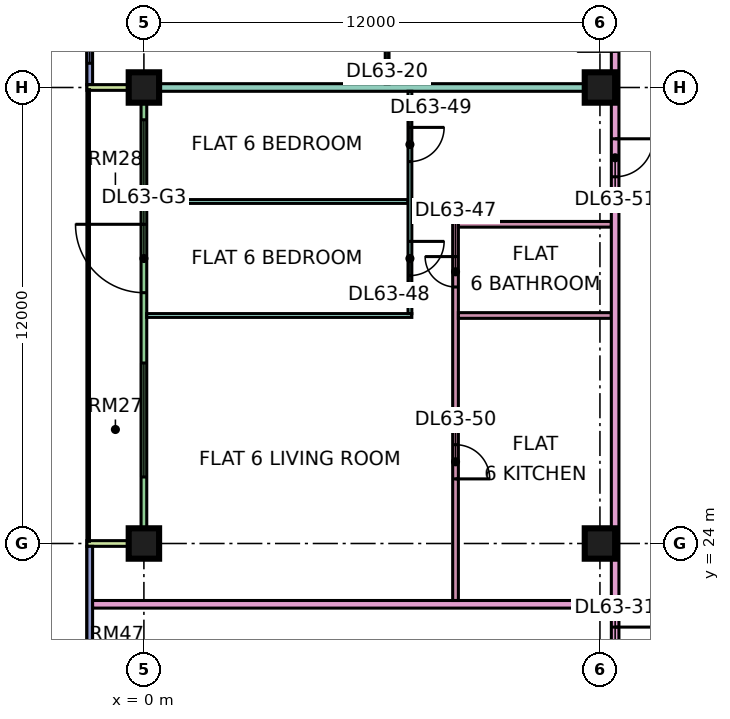
"""IFC4 building model, lengths in metres.
Left out: names, types, materials, properties, quantities, classifications, styles, units other than length and angle.
Written with IfcOpenShell. Run it as: python <this file> out.ifc"""

import sys

from ifc_helpers import new_model, si_unit, direction, frame, frame_2d, origin, origin_2d, place, context, subcontext, project, spatial, rectangle, extrude, element, fill, save


model = new_model("IFC4")
c1 = context("Model", 3, precision=1e-05, world=origin(), true_north=direction((0.0, 1.0)))
c2 = subcontext(c1, "Body", "Model", "MODEL_VIEW")
j1 = project(units=[si_unit("LENGTHUNIT", "METRE"), si_unit("PLANEANGLEUNIT", "RADIAN")], contexts=[c1])
p1 = place(None, origin())
s1 = spatial("IfcSite", under=j1, at=p1, CompositionType="ELEMENT")
p2 = place(p1, origin())
s2 = spatial("IfcBuilding", under=s1, at=p2, CompositionType="ELEMENT")
p3 = place(p2, frame((0.0, 0.0, 273.4)))
s3 = spatial("IfcBuildingStorey", under=s2, at=p3, CompositionType="ELEMENT", Elevation=273.4)
p4 = place(p3, frame((0.0, 24.0, 0.0), z_axis=(0.0, 0.0, 1.0), x_axis=(1.0, 0.0, 0.0)))
e1 = element("IfcColumn", 1, at=p4, inside=s3, PredefinedType="COLUMN", context=c2, shape_type="SweptSolid", body=[
    extrude(rectangle(XDim=0.8, YDim=0.8, at=origin_2d()), origin(), (0.0, 0.0, 1.0), 3.75),
])
p5 = place(p3, frame((0.0, 36.0, 0.0), z_axis=(0.0, 0.0, 1.0), x_axis=(1.0, 0.0, 0.0)))
e2 = element("IfcColumn", 2, at=p5, inside=s3, PredefinedType="COLUMN", context=c2, shape_type="SweptSolid", body=[
    extrude(rectangle(XDim=0.8, YDim=0.8, at=origin_2d()), origin(), (0.0, 0.0, 1.0), 3.75),
])
for number, where, z_axis, x_axis in (
    (3, (12.0, 24.0, 0.0), (0.0, 0.0, 1.0), (1.0, 0.0, 0.0)),
    (4, (12.0, 36.0, 0.0), (0.0, 0.0, 1.0), (1.0, 0.0, 0.0)),
):
    element("IfcColumn", number, at=place(p3, frame(where, z_axis=z_axis, x_axis=x_axis)), inside=s3, PredefinedType="COLUMN", context=c2, shape_type="SweptSolid", body=[
        extrude(rectangle(XDim=0.8, YDim=0.8, at=origin_2d()), origin(), (0.0, 0.0, 1.0), 3.75),
    ])
p6 = place(p3, frame((-1.425, 47.925, 0.0), z_axis=(0.0, 0.0, 1.0), x_axis=(0.0, -1.0, 0.0)))
e5 = element("IfcWall", 5, at=p6, inside=s3, PredefinedType="SOLIDWALL", context=c2, shape_type="SweptSolid", body=[
    extrude(rectangle(XDim=11.85, YDim=0.15, at=frame_2d((5.925, 0.0))), origin(), (0.0, 0.0, 1.0), 3.35),
])
p7 = place(p6, frame((1.462, 0.0, 0.45)))
e6 = element("IfcOpeningElement", 6, at=p7, cuts=e5, PredefinedType="OPENING", context=c2, shape_type="SweptSolid", body=[
    extrude(rectangle(XDim=3.0, YDim=2.4, at=frame_2d((1.5, 1.2))), frame((0.0, 0.085, 0.0), z_axis=(0.0, -1.0, 0.0), x_axis=(1.0, 0.0, 0.0)), (0.0, 0.0, 1.0), 0.17),
])
p8 = place(p6, frame((6.525, 0.0, 0.45)))
e7 = element("IfcOpeningElement", 7, at=p8, cuts=e5, PredefinedType="OPENING", context=c2, shape_type="SweptSolid", body=[
    extrude(rectangle(XDim=1.8, YDim=2.4, at=frame_2d((0.9, 1.2))), frame((0.0, 0.085, 0.0), z_axis=(0.0, -1.0, 0.0), x_axis=(1.0, 0.0, 0.0)), (0.0, 0.0, 1.0), 0.17),
])
p9 = place(p6, frame((9.488, 0.0, 0.45)))
e8 = element("IfcOpeningElement", 8, at=p9, cuts=e5, PredefinedType="OPENING", context=c2, shape_type="SweptSolid", body=[
    extrude(rectangle(XDim=1.8, YDim=2.4, at=frame_2d((0.9, 1.2))), frame((0.0, 0.085, 0.0), z_axis=(0.0, -1.0, 0.0), x_axis=(1.0, 0.0, 0.0)), (0.0, 0.0, 1.0), 0.17),
])
p10 = place(p3, frame((0.0, 35.925, 0.0), z_axis=(0.0, 0.0, 1.0), x_axis=(0.0, -1.0, 0.0)))
e9 = element("IfcWall", 9, at=p10, inside=s3, PredefinedType="SOLIDWALL", context=c2, shape_type="SweptSolid", body=[
    extrude(rectangle(XDim=11.85, YDim=0.15, at=frame_2d((5.925, 0.0))), origin(), (0.0, 0.0, 1.0), 3.35),
])
p11 = place(p10, frame((0.775, 0.0, 0.45)))
e10 = element("IfcOpeningElement", 10, at=p11, cuts=e9, PredefinedType="OPENING", context=c2, shape_type="SweptSolid", body=[
    extrude(rectangle(XDim=1.8, YDim=2.4, at=frame_2d((0.9, 1.2))), frame((0.0, 0.085, 0.0), z_axis=(0.0, -1.0, 0.0), x_axis=(1.0, 0.0, 0.0)), (0.0, 0.0, 1.0), 0.17),
])
p12 = place(p10, frame((3.525, 0.0, 0.0)))
e11 = element("IfcOpeningElement", 11, at=p12, cuts=e9, PredefinedType="OPENING", context=c2, shape_type="SweptSolid", body=[
    extrude(rectangle(XDim=1.8, YDim=2.4, at=frame_2d((0.9, 1.2))), frame((0.0, 0.085, 0.0), z_axis=(0.0, -1.0, 0.0), x_axis=(1.0, 0.0, 0.0)), (0.0, 0.0, 1.0), 0.17),
])
p13 = place(p10, frame((7.175, 0.0, 0.45)))
e12 = element("IfcOpeningElement", 12, at=p13, cuts=e9, PredefinedType="OPENING", context=c2, shape_type="SweptSolid", body=[
    extrude(rectangle(XDim=3.0, YDim=2.4, at=frame_2d((1.5, 1.2))), frame((0.0, 0.085, 0.0), z_axis=(0.0, -1.0, 0.0), x_axis=(1.0, 0.0, 0.0)), (0.0, 0.0, 1.0), 0.17),
])
for number, where, z_axis, x_axis in (
    (13, (-1.5, 36.0, 0.0), (0.0, 0.0, 1.0), (1.0, 0.0, 0.0)),
    (14, (-1.5, 24.0, 0.0), (0.0, 0.0, 1.0), (1.0, 0.0, 0.0)),
):
    element("IfcWall", number, at=place(p3, frame(where, z_axis=z_axis, x_axis=x_axis)), inside=s3, PredefinedType="SOLIDWALL", context=c2, shape_type="SweptSolid", body=[
        extrude(rectangle(XDim=1.5, YDim=0.15, at=frame_2d((0.75, 0.0))), origin(), (0.0, 0.0, 1.0), 3.35),
    ])
p14 = place(p3, frame((-1.425, 23.925, 0.0), z_axis=(0.0, 0.0, 1.0), x_axis=(0.0, -1.0, 0.0)))
e15 = element("IfcWall", 15, at=p14, inside=s3, PredefinedType="SOLIDWALL", context=c2, shape_type="SweptSolid", body=[
    extrude(rectangle(XDim=11.425, YDim=0.15, at=frame_2d((5.712, 0.0))), origin(), (0.0, 0.0, 1.0), 3.35),
])
p15 = place(p14, frame((6.175, 0.0, 0.45)))
e16 = element("IfcOpeningElement", 16, at=p15, cuts=e15, PredefinedType="OPENING", context=c2, shape_type="SweptSolid", body=[
    extrude(rectangle(XDim=3.0, YDim=2.4, at=frame_2d((1.5, 1.2))), frame((0.0, 0.085, 0.0), z_axis=(0.0, -1.0, 0.0), x_axis=(1.0, 0.0, 0.0)), (0.0, 0.0, 1.0), 0.17),
])
p16 = place(p3, frame((-1.35, 22.4, 0.0), z_axis=(0.0, 0.0, 1.0), x_axis=(1.0, 0.0, 0.0)))
e17 = element("IfcWall", 17, at=p16, inside=s3, PredefinedType="PARTITIONING", context=c2, shape_type="SweptSolid", body=[
    extrude(rectangle(XDim=13.65, YDim=0.2, at=frame_2d((6.825, 0.0))), origin(), (0.0, 0.0, 1.0), 3.35),
])
e18 = element("IfcWall", 18, at=p5, inside=s3, PredefinedType="PARTITIONING", context=c2, shape_type="SweptSolid", body=[
    extrude(rectangle(XDim=12.3, YDim=0.2, at=frame_2d((6.15, 0.0))), origin(), (0.0, 0.0, 1.0), 3.35),
])
p17 = place(p3, frame((0.074, 30.0, 0.0), z_axis=(0.0, 0.0, 1.0), x_axis=(1.0, 0.0, 0.0)))
e19 = element("IfcWall", 19, at=p17, inside=s3, PredefinedType="PARTITIONING", context=c2, shape_type="SweptSolid", body=[
    extrude(rectangle(XDim=6.976, YDim=0.1, at=frame_2d((3.488, 0.0))), origin(), (0.0, 0.0, 1.0), 3.35),
])
p18 = place(p3, frame((0.074, 33.0, 0.0), z_axis=(0.0, 0.0, 1.0), x_axis=(1.0, 0.0, 0.0)))
e20 = element("IfcWall", 20, at=p18, inside=s3, PredefinedType="PARTITIONING", context=c2, shape_type="SweptSolid", body=[
    extrude(rectangle(XDim=6.876, YDim=0.1, at=frame_2d((3.438, 0.0))), origin(), (0.0, 0.0, 1.0), 3.35),
])
p19 = place(p3, frame((6.4, 36.1, 0.0), z_axis=(0.0, 0.0, 1.0), x_axis=(0.0, 1.0, 0.0)))
e21 = element("IfcWall", 21, at=p19, inside=s3, PredefinedType="PARTITIONING", context=c2, shape_type="SweptSolid", body=[
    extrude(rectangle(XDim=5.85, YDim=0.1, at=frame_2d((2.925, 0.0))), origin(), (0.0, 0.0, 1.0), 3.35),
])
p20 = place(p19, frame((0.95, 0.0, 0.0)))
e22 = element("IfcOpeningElement", 22, at=p20, cuts=e21, PredefinedType="OPENING", context=c2, shape_type="SweptSolid", body=[
    extrude(rectangle(XDim=0.9, YDim=2.1, at=frame_2d((0.45, 1.05))), frame((0.0, 0.06, 0.0), z_axis=(0.0, -1.0, 0.0), x_axis=(1.0, 0.0, 0.0)), (0.0, 0.0, 1.0), 0.12),
])
p21 = place(p19, frame((3.95, 0.0, 0.0)))
e23 = element("IfcOpeningElement", 23, at=p21, cuts=e21, PredefinedType="OPENING", context=c2, shape_type="SweptSolid", body=[
    extrude(rectangle(XDim=0.9, YDim=2.1, at=frame_2d((0.45, 1.05))), frame((0.0, 0.06, 0.0), z_axis=(0.0, -1.0, 0.0), x_axis=(1.0, 0.0, 0.0)), (0.0, 0.0, 1.0), 0.12),
])
p22 = place(p3, frame((7.0, 30.05, 0.0), z_axis=(0.0, 0.0, 1.0), x_axis=(0.0, 1.0, 0.0)))
e24 = element("IfcWall", 24, at=p22, inside=s3, PredefinedType="PARTITIONING", context=c2, shape_type="SweptSolid", body=[
    extrude(rectangle(XDim=5.85, YDim=0.1, at=frame_2d((2.925, 0.0))), origin(), (0.0, 0.0, 1.0), 3.35),
])
p23 = place(p22, frame((1.0, 0.0, 0.0)))
e25 = element("IfcOpeningElement", 25, at=p23, cuts=e24, PredefinedType="OPENING", context=c2, shape_type="SweptSolid", body=[
    extrude(rectangle(XDim=0.9, YDim=2.1, at=frame_2d((0.45, 1.05))), frame((0.0, 0.06, 0.0), z_axis=(0.0, -1.0, 0.0), x_axis=(1.0, 0.0, 0.0)), (0.0, 0.0, 1.0), 0.12),
])
p24 = place(p22, frame((4.0, 0.0, 0.0)))
e26 = element("IfcOpeningElement", 26, at=p24, cuts=e24, PredefinedType="OPENING", context=c2, shape_type="SweptSolid", body=[
    extrude(rectangle(XDim=0.9, YDim=2.1, at=frame_2d((0.45, 1.05))), frame((0.0, 0.06, 0.0), z_axis=(0.0, -1.0, 0.0), x_axis=(1.0, 0.0, 0.0)), (0.0, 0.0, 1.0), 0.12),
])
p25 = place(p3, frame((8.2, 22.5, 0.0), z_axis=(0.0, 0.0, 1.0), x_axis=(0.0, 1.0, 0.0)))
e27 = element("IfcWall", 27, at=p25, inside=s3, PredefinedType="PARTITIONING", context=c2, shape_type="SweptSolid", body=[
    extrude(rectangle(XDim=9.975, YDim=0.15, at=frame_2d((4.988, 0.0))), origin(), (0.0, 0.0, 1.0), 3.35),
])
p26 = place(p25, frame((8.25, 0.0, 0.0)))
e28 = element("IfcOpeningElement", 28, at=p26, cuts=e27, PredefinedType="OPENING", context=c2, shape_type="SweptSolid", body=[
    extrude(rectangle(XDim=0.8, YDim=2.1, at=frame_2d((0.4, 1.05))), frame((0.0, 0.085, 0.0), z_axis=(0.0, -1.0, 0.0), x_axis=(1.0, 0.0, 0.0)), (0.0, 0.0, 1.0), 0.17),
])
p27 = place(p25, frame((3.2, 0.0, 0.0)))
e29 = element("IfcOpeningElement", 29, at=p27, cuts=e27, PredefinedType="OPENING", context=c2, shape_type="SweptSolid", body=[
    extrude(rectangle(XDim=0.9, YDim=2.1, at=frame_2d((0.45, 1.05))), frame((0.0, 0.085, 0.0), z_axis=(0.0, -1.0, 0.0), x_axis=(1.0, 0.0, 0.0)), (0.0, 0.0, 1.0), 0.17),
])
for number, where, z_axis, x_axis in (
    (30, (8.275, 30.0, 0.0), (0.0, 0.0, 1.0), (1.0, 0.0, 0.0)),
    (31, (8.275, 32.4, 0.0), (0.0, 0.0, 1.0), (1.0, 0.0, 0.0)),
):
    element("IfcWall", number, at=place(p3, frame(where, z_axis=z_axis, x_axis=x_axis)), inside=s3, PredefinedType="PARTITIONING", context=c2, shape_type="SweptSolid", body=[
        extrude(rectangle(XDim=4.025, YDim=0.15, at=frame_2d((2.013, 0.0))), origin(), (0.0, 0.0, 1.0), 3.35),
    ])
p28 = place(p3, frame((12.4, 20.0, 0.0), z_axis=(0.0, 0.0, 1.0), x_axis=(0.0, 1.0, 0.0)))
e32 = element("IfcWall", 32, at=p28, inside=s3, PredefinedType="PARTITIONING", context=c2, shape_type="SweptSolid", body=[
    extrude(rectangle(XDim=34.0, YDim=0.2, at=frame_2d((17.0, 0.0))), origin(), (0.0, 0.0, 1.0), 3.35),
])
p29 = place(p28, frame((16.95, 0.0, 0.0)))
e33 = element("IfcOpeningElement", 33, at=p29, cuts=e32, PredefinedType="OPENING", context=c2, shape_type="SweptSolid", body=[
    extrude(rectangle(XDim=1.0, YDim=2.1, at=frame_2d((0.5, 1.05))), frame((0.0, 0.11, 0.0), z_axis=(0.0, -1.0, 0.0), x_axis=(1.0, 0.0, 0.0)), (0.0, 0.0, 1.0), 0.22),
])
p30 = place(p28, frame((0.6, 0.0, 0.0)))
e34 = element("IfcOpeningElement", 34, at=p30, cuts=e32, PredefinedType="OPENING", context=c2, shape_type="SweptSolid", body=[
    extrude(rectangle(XDim=1.2, YDim=2.1, at=frame_2d((0.6, 1.05))), frame((0.0, 0.11, 0.0), z_axis=(0.0, -1.0, 0.0), x_axis=(1.0, 0.0, 0.0)), (0.0, 0.0, 1.0), 0.22),
])
p31 = place(p28, frame((13.65, 0.0, 0.0)))
e35 = element("IfcOpeningElement", 35, at=p31, cuts=e32, PredefinedType="OPENING", context=c2, shape_type="SweptSolid", body=[
    extrude(rectangle(XDim=1.0, YDim=2.1, at=frame_2d((0.5, 1.05))), frame((0.0, 0.11, 0.0), z_axis=(0.0, -1.0, 0.0), x_axis=(1.0, 0.0, 0.0)), (0.0, 0.0, 1.0), 0.22),
])
p32 = place(p9, origin())
e36 = element("IfcWindow", 36, at=p32, inside=s3, PartitioningType="SINGLE_PANEL", PredefinedType="WINDOW", context=c2, shape_type="SweptSolid", body=[
    extrude(rectangle(XDim=1.8, YDim=2.4, at=frame_2d((0.9, 1.2))), frame((0.0, 0.03, 0.0), z_axis=(0.0, -1.0, 0.0), x_axis=(1.0, 0.0, 0.0)), (0.0, 0.0, 1.0), 0.06),
])
fill(e8, e36)
p33 = place(p11, origin())
e37 = element("IfcWindow", 37, at=p33, inside=s3, PartitioningType="SINGLE_PANEL", PredefinedType="WINDOW", context=c2, shape_type="SweptSolid", body=[
    extrude(rectangle(XDim=1.8, YDim=2.4, at=frame_2d((0.9, 1.2))), frame((0.0, 0.03, 0.0), z_axis=(0.0, -1.0, 0.0), x_axis=(1.0, 0.0, 0.0)), (0.0, 0.0, 1.0), 0.06),
])
fill(e10, e37)
p34 = place(p12, frame((1.8, 0.0, 0.0), z_axis=(0.0, 0.0, 1.0), x_axis=(-1.0, 0.0, 0.0)))
e38 = element("IfcDoor", 38, at=p34, inside=s3, OperationType="DOUBLE_DOOR_SINGLE_SWING", PredefinedType="DOOR", context=c2, shape_type="SweptSolid", body=[
    extrude(rectangle(XDim=1.8, YDim=2.4, at=frame_2d((0.9, 1.2))), frame((0.0, 0.025, 0.0), z_axis=(0.0, -1.0, 0.0), x_axis=(1.0, 0.0, 0.0)), (0.0, 0.0, 1.0), 0.05),
])
fill(e11, e38)
p35 = place(p13, origin())
e39 = element("IfcWindow", 39, at=p35, inside=s3, PartitioningType="SINGLE_PANEL", PredefinedType="WINDOW", context=c2, shape_type="SweptSolid", body=[
    extrude(rectangle(XDim=3.0, YDim=2.4, at=frame_2d((1.5, 1.2))), frame((0.0, 0.03, 0.0), z_axis=(0.0, -1.0, 0.0), x_axis=(1.0, 0.0, 0.0)), (0.0, 0.0, 1.0), 0.06),
])
fill(e12, e39)
p36 = place(p30, origin())
e40 = element("IfcDoor", 40, at=p36, inside=s3, OperationType="SINGLE_SWING_RIGHT", PredefinedType="DOOR", context=c2, shape_type="SweptSolid", body=[
    extrude(rectangle(XDim=1.2, YDim=2.1, at=frame_2d((0.6, 1.05))), frame((0.0, 0.025, 0.0), z_axis=(0.0, -1.0, 0.0), x_axis=(1.0, 0.0, 0.0)), (0.0, 0.0, 1.0), 0.05),
])
fill(e34, e40)
p37 = place(p26, frame((0.8, 0.0, 0.0), z_axis=(0.0, 0.0, 1.0), x_axis=(-1.0, 0.0, 0.0)))
e41 = element("IfcDoor", 41, at=p37, inside=s3, OperationType="SINGLE_SWING_RIGHT", PredefinedType="DOOR", context=c2, shape_type="SweptSolid", body=[
    extrude(rectangle(XDim=0.8, YDim=2.1, at=frame_2d((0.4, 1.05))), frame((0.0, 0.025, 0.0), z_axis=(0.0, -1.0, 0.0), x_axis=(1.0, 0.0, 0.0)), (0.0, 0.0, 1.0), 0.05),
])
fill(e28, e41)
p38 = place(p23, origin())
e42 = element("IfcDoor", 42, at=p38, inside=s3, OperationType="SINGLE_SWING_RIGHT", PredefinedType="DOOR", context=c2, shape_type="SweptSolid", body=[
    extrude(rectangle(XDim=0.9, YDim=2.1, at=frame_2d((0.45, 1.05))), frame((0.0, 0.025, 0.0), z_axis=(0.0, -1.0, 0.0), x_axis=(1.0, 0.0, 0.0)), (0.0, 0.0, 1.0), 0.05),
])
fill(e25, e42)
p39 = place(p24, origin())
e43 = element("IfcDoor", 43, at=p39, inside=s3, OperationType="SINGLE_SWING_RIGHT", PredefinedType="DOOR", context=c2, shape_type="SweptSolid", body=[
    extrude(rectangle(XDim=0.9, YDim=2.1, at=frame_2d((0.45, 1.05))), frame((0.0, 0.025, 0.0), z_axis=(0.0, -1.0, 0.0), x_axis=(1.0, 0.0, 0.0)), (0.0, 0.0, 1.0), 0.05),
])
fill(e26, e43)
p40 = place(p27, frame((0.9, 0.0, 0.0), z_axis=(0.0, 0.0, 1.0), x_axis=(-1.0, 0.0, 0.0)))
e44 = element("IfcDoor", 44, at=p40, inside=s3, OperationType="SINGLE_SWING_LEFT", PredefinedType="DOOR", context=c2, shape_type="SweptSolid", body=[
    extrude(rectangle(XDim=0.9, YDim=2.1, at=frame_2d((0.45, 1.05))), frame((0.0, 0.025, 0.0), z_axis=(0.0, -1.0, 0.0), x_axis=(1.0, 0.0, 0.0)), (0.0, 0.0, 1.0), 0.05),
])
fill(e29, e44)
p41 = place(p31, origin())
e45 = element("IfcDoor", 45, at=p41, inside=s3, OperationType="SINGLE_SWING_RIGHT", PredefinedType="DOOR", context=c2, shape_type="SweptSolid", body=[
    extrude(rectangle(XDim=1.0, YDim=2.1, at=frame_2d((0.5, 1.05))), frame((0.0, 0.025, 0.0), z_axis=(0.0, -1.0, 0.0), x_axis=(1.0, 0.0, 0.0)), (0.0, 0.0, 1.0), 0.05),
])
fill(e35, e45)
save(model, sys.argv[1])
